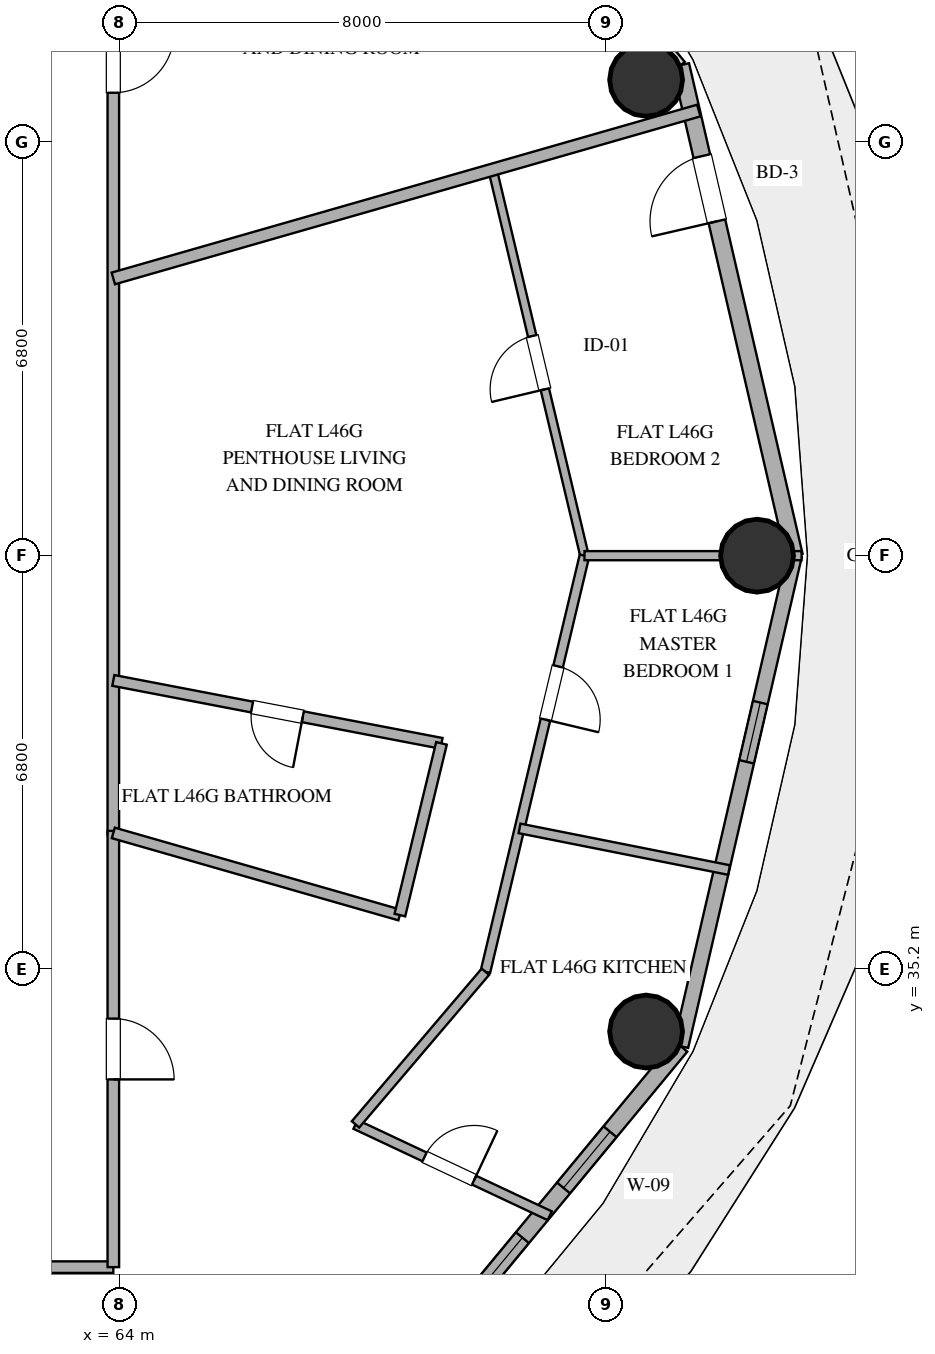
"""IFC4 building model, lengths in metres.
Left out: names, types, materials, properties, quantities, classifications, styles, units other than length and angle.
Written with IfcOpenShell. Run it as: python <this file> out.ifc"""

import sys

from ifc_helpers import new_model, si_unit, direction, frame, frame_2d, origin, origin_2d, place, context, subcontext, project, spatial, rectangle, hollow_circle, extrude, element, fill, save


model = new_model("IFC4")
c1 = context("Model", 3, precision=1e-05, world=origin(), true_north=direction((0.0, 1.0)))
c2 = subcontext(c1, "Body", "Model", "MODEL_VIEW")
j1 = project(units=[si_unit("LENGTHUNIT", "METRE"), si_unit("PLANEANGLEUNIT", "RADIAN")], contexts=[c1])
p1 = place(None, origin())
s1 = spatial("IfcSite", under=j1, at=p1, CompositionType="ELEMENT")
p2 = place(p1, origin())
s2 = spatial("IfcBuilding", under=s1, at=p2, CompositionType="ELEMENT")
p3 = place(p2, frame((0.0, 0.0, 183.0)))
s3 = spatial("IfcBuildingStorey", under=s2, at=p3, CompositionType="ELEMENT", Elevation=183.0)
for number, where, z_axis, x_axis in (
    (1, (74.487, 42.0, 0.0), (0.0, 0.0, 1.0), (1.0, 0.0, 0.0)),
    (2, (72.662, 49.826, 0.0), (0.0, 0.0, 1.0), (1.0, 0.0, 0.0)),
    (3, (72.662, 34.174, 0.0), (0.0, 0.0, 1.0), (1.0, 0.0, 0.0)),
):
    element("IfcColumn", number, at=place(p3, frame(where, z_axis=z_axis, x_axis=x_axis)), inside=s3, PredefinedType="COLUMN", context=c2, shape_type="SweptSolid", body=[
        extrude(hollow_circle(Radius=0.6, WallThickness=0.032, at=origin_2d()), origin(), (0.0, 0.0, 1.0), 3.38),
    ])
p4 = place(p3, frame((75.099, 42.0, 0.0), z_axis=(0.0, 0.0, 1.0), x_axis=(-0.225473184558, 0.974249374157, 0.0)))
e4 = element("IfcWall", 4, at=p4, inside=s3, PredefinedType="SOLIDWALL", context=c2, shape_type="SweptSolid", body=[
    extrude(rectangle(XDim=8.28, YDim=0.28, at=frame_2d((4.14, 0.0))), origin(), (0.0, 0.0, 1.0), 3.38),
])
p5 = place(p4, frame((5.644, 0.0, 0.0)))
e5 = element("IfcOpeningElement", 5, at=p5, cuts=e4, PredefinedType="OPENING", context=c2, shape_type="SweptSolid", body=[
    extrude(rectangle(XDim=1.1, YDim=2.25, at=frame_2d((0.55, 1.125))), frame((0.0, 0.15, 0.0), z_axis=(0.0, -1.0, 0.0), x_axis=(1.0, 0.0, 0.0)), (0.0, 0.0, 1.0), 0.3),
])
p6 = place(p3, frame((67.576, 27.094, 0.0), z_axis=(0.0, 0.0, 1.0), x_axis=(0.637333477683, 0.770588111915, 0.0)))
e6 = element("IfcWall", 6, at=p6, inside=s3, PredefinedType="SOLIDWALL", context=c2, shape_type="SweptSolid", body=[
    extrude(rectangle(XDim=8.875, YDim=0.28, at=frame_2d((4.438, 0.0))), origin(), (0.0, 0.0, 1.0), 3.38),
])
p7 = place(p6, frame((1.775, 0.0, 0.85)))
e7 = element("IfcOpeningElement", 7, at=p7, cuts=e6, PredefinedType="OPENING", context=c2, shape_type="SweptSolid", body=[
    extrude(rectangle(XDim=1.35, YDim=1.8, at=frame_2d((0.675, 0.9))), frame((0.0, 0.15, 0.0), z_axis=(0.0, -1.0, 0.0), x_axis=(1.0, 0.0, 0.0)), (0.0, 0.0, 1.0), 0.3),
])
p8 = place(p6, frame((3.439, 0.0, 0.85)))
e8 = element("IfcOpeningElement", 8, at=p8, cuts=e6, PredefinedType="OPENING", context=c2, shape_type="SweptSolid", body=[
    extrude(rectangle(XDim=1.35, YDim=1.8, at=frame_2d((0.675, 0.9))), frame((0.0, 0.15, 0.0), z_axis=(0.0, -1.0, 0.0), x_axis=(1.0, 0.0, 0.0)), (0.0, 0.0, 1.0), 0.3),
])
p9 = place(p6, frame((5.85, 0.0, 0.85)))
e9 = element("IfcOpeningElement", 9, at=p9, cuts=e6, PredefinedType="OPENING", context=c2, shape_type="SweptSolid", body=[
    extrude(rectangle(XDim=1.2, YDim=1.8, at=frame_2d((0.6, 0.9))), frame((0.0, 0.15, 0.0), z_axis=(0.0, -1.0, 0.0), x_axis=(1.0, 0.0, 0.0)), (0.0, 0.0, 1.0), 0.3),
])
p10 = place(p3, frame((73.232, 33.933, 0.0), z_axis=(0.0, 0.0, 1.0), x_axis=(0.225473184558, 0.974249374157, 0.0)))
e10 = element("IfcWall", 10, at=p10, inside=s3, PredefinedType="SOLIDWALL", context=c2, shape_type="SweptSolid", body=[
    extrude(rectangle(XDim=8.28, YDim=0.25, at=frame_2d((4.14, 0.0))), origin(), (0.0, 0.0, 1.0), 3.38),
])
p11 = place(p10, frame((4.801, 0.0, 0.35)))
e11 = element("IfcOpeningElement", 11, at=p11, cuts=e10, PredefinedType="OPENING", context=c2, shape_type="SweptSolid", body=[
    extrude(rectangle(XDim=1.0, YDim=1.05, at=frame_2d((0.5, 0.525))), frame((0.0, 0.135, 0.0), z_axis=(0.0, -1.0, 0.0), x_axis=(1.0, 0.0, 0.0)), (0.0, 0.0, 1.0), 0.27),
])
p12 = place(p3, frame((46.818, 30.3, 0.0), z_axis=(0.0, 0.0, 1.0), x_axis=(1.0, 0.0, 0.0)))
e12 = element("IfcWall", 12, at=p12, inside=s3, PredefinedType="PARTITIONING", context=c2, shape_type="SweptSolid", body=[
    extrude(rectangle(XDim=17.082, YDim=0.19, at=frame_2d((8.541, 0.0))), origin(), (0.0, 0.0, 1.0), 2.74),
])
p13 = place(p12, frame((5.358, 0.0, 0.0)))
e13 = element("IfcOpeningElement", 13, at=p13, cuts=e12, PredefinedType="OPENING", context=c2, shape_type="SweptSolid", body=[
    extrude(rectangle(XDim=1.0, YDim=2.2, at=frame_2d((0.5, 1.1))), frame((0.0, 0.105, 0.0), z_axis=(0.0, -1.0, 0.0), x_axis=(1.0, 0.0, 0.0)), (0.0, 0.0, 1.0), 0.21),
])
p14 = place(p3, frame((63.9, 53.7, 0.0), z_axis=(0.0, 0.0, 1.0), x_axis=(0.0, -1.0, 0.0)))
e14 = element("IfcWall", 14, at=p14, inside=s3, PredefinedType="PARTITIONING", context=c2, shape_type="SweptSolid", body=[
    extrude(rectangle(XDim=16.292, YDim=0.19, at=frame_2d((8.146, 0.0))), origin(), (0.0, 0.0, 1.0), 2.74),
])
p15 = place(p14, frame((3.087, 0.0, 0.0)))
e15 = element("IfcOpeningElement", 15, at=p15, cuts=e14, PredefinedType="OPENING", context=c2, shape_type="SweptSolid", body=[
    extrude(rectangle(XDim=1.0, YDim=2.2, at=frame_2d((0.5, 1.1))), frame((0.0, 0.105, 0.0), z_axis=(0.0, -1.0, 0.0), x_axis=(1.0, 0.0, 0.0)), (0.0, 0.0, 1.0), 0.21),
])
p16 = place(p3, frame((63.9, 37.474, 0.0), z_axis=(0.0, 0.0, 1.0), x_axis=(0.0, -1.0, 0.0)))
e16 = element("IfcWall", 16, at=p16, inside=s3, PredefinedType="PARTITIONING", context=c2, shape_type="SweptSolid", body=[
    extrude(rectangle(XDim=7.174, YDim=0.19, at=frame_2d((3.587, 0.0))), origin(), (0.0, 0.0, 1.0), 2.74),
])
p17 = place(p16, frame((3.087, 0.0, 0.0)))
e17 = element("IfcOpeningElement", 17, at=p17, cuts=e16, PredefinedType="OPENING", context=c2, shape_type="SweptSolid", body=[
    extrude(rectangle(XDim=1.0, YDim=2.2, at=frame_2d((0.5, 1.1))), frame((0.0, 0.105, 0.0), z_axis=(0.0, -1.0, 0.0), x_axis=(1.0, 0.0, 0.0)), (0.0, 0.0, 1.0), 0.21),
])
p18 = place(p3, frame((71.649, 42.0, 0.0), z_axis=(0.0, 0.0, 1.0), x_axis=(-0.231639074409, 0.972801798522, 0.0)))
e18 = element("IfcWall", 18, at=p18, inside=s3, PredefinedType="PARTITIONING", context=c2, shape_type="SweptSolid", body=[
    extrude(rectangle(XDim=6.525, YDim=0.14, at=frame_2d((3.263, 0.0))), origin(), (0.0, 0.0, 1.0), 2.74),
])
p19 = place(p18, frame((2.812, 0.0, 0.0)))
e19 = element("IfcOpeningElement", 19, at=p19, cuts=e18, PredefinedType="OPENING", context=c2, shape_type="SweptSolid", body=[
    extrude(rectangle(XDim=0.9, YDim=2.1, at=frame_2d((0.45, 1.05))), frame((0.0, 0.08, 0.0), z_axis=(0.0, -1.0, 0.0), x_axis=(1.0, 0.0, 0.0)), (0.0, 0.0, 1.0), 0.16),
])
p20 = place(p3, frame((73.528, 49.32, 0.0), z_axis=(0.0, 0.0, 1.0), x_axis=(-0.961265987417, -0.275622389211, 0.0)))
e20 = element("IfcWall", 20, at=p20, inside=s3, PredefinedType="PARTITIONING", context=c2, shape_type="SweptSolid", body=[
    extrude(rectangle(XDim=10.016, YDim=0.2, at=frame_2d((5.008, 0.0))), origin(), (0.0, 0.0, 1.0), 2.74),
])
p21 = place(p3, frame((69.297, 38.914, 0.0), z_axis=(0.0, 0.0, 1.0), x_axis=(-0.982108019882, 0.188318446478, 0.0)))
e21 = element("IfcWall", 21, at=p21, inside=s3, PredefinedType="PLUMBINGWALL", context=c2, shape_type="SweptSolid", body=[
    extrude(rectangle(XDim=5.496, YDim=0.18, at=frame_2d((2.748, 0.0))), origin(), (0.0, 0.0, 1.0), 2.74),
])
p22 = place(p21, frame((2.323, 0.0, 0.0)))
e22 = element("IfcOpeningElement", 22, at=p22, cuts=e21, PredefinedType="OPENING", context=c2, shape_type="SweptSolid", body=[
    extrude(rectangle(XDim=0.85, YDim=2.1, at=frame_2d((0.425, 1.05))), frame((0.0, 0.1, 0.0), z_axis=(0.0, -1.0, 0.0), x_axis=(1.0, 0.0, 0.0)), (0.0, 0.0, 1.0), 0.2),
])
p23 = place(p3, frame((63.9, 37.441, 0.0), z_axis=(0.0, 0.0, 1.0), x_axis=(0.961266088446, -0.27562203686, 0.0)))
e23 = element("IfcWall", 23, at=p23, inside=s3, PredefinedType="PLUMBINGWALL", context=c2, shape_type="SweptSolid", body=[
    extrude(rectangle(XDim=4.903, YDim=0.18, at=frame_2d((2.451, 0.0))), origin(), (0.0, 0.0, 1.0), 2.74),
])
p24 = place(p3, frame((71.649, 42.0, 0.0), z_axis=(0.0, 0.0, 1.0), x_axis=(-0.231625219966, -0.972805097373, 0.0)))
e24 = element("IfcWall", 24, at=p24, inside=s3, PredefinedType="PLUMBINGWALL", context=c2, shape_type="SweptSolid", body=[
    extrude(rectangle(XDim=7.033, YDim=0.16, at=frame_2d((3.517, 0.0))), origin(), (0.0, 0.0, 1.0), 2.74),
])
p25 = place(p24, frame((1.871, 0.0, 0.0)))
e25 = element("IfcOpeningElement", 25, at=p25, cuts=e24, PredefinedType="OPENING", context=c2, shape_type="SweptSolid", body=[
    extrude(rectangle(XDim=0.9, YDim=2.1, at=frame_2d((0.45, 1.05))), frame((0.0, 0.09, 0.0), z_axis=(0.0, -1.0, 0.0), x_axis=(1.0, 0.0, 0.0)), (0.0, 0.0, 1.0), 0.18),
])
p26 = place(p3, frame((63.445, 24.846, 0.0), z_axis=(0.0, 0.0, 1.0), x_axis=(-0.669111750453, 0.743161802979, 0.0)))
e26 = element("IfcWall", 26, at=p26, inside=s3, PredefinedType="PARTITIONING", context=c2, shape_type="SweptSolid", body=[
    extrude(rectangle(XDim=7.339, YDim=0.2, at=frame_2d((3.669, 0.0))), origin(), (0.0, 0.0, 1.0), 2.74),
])
p27 = place(p3, frame((75.219, 42.0, 0.0), z_axis=(0.0, 0.0, 1.0), x_axis=(-1.0, 0.0, 0.0)))
e27 = element("IfcWall", 27, at=p27, inside=s3, PredefinedType="PARTITIONING", context=c2, shape_type="SweptSolid", body=[
    extrude(rectangle(XDim=3.571, YDim=0.15, at=frame_2d((1.785, 0.0))), origin(), (0.0, 0.0, 1.0), 2.74),
])
p28 = place(p3, frame((67.883, 32.647, 0.0), z_axis=(0.0, 0.0, 1.0), x_axis=(0.904904903403, -0.425613810628, 0.0)))
e28 = element("IfcWall", 28, at=p28, inside=s3, PredefinedType="PLUMBINGWALL", context=c2, shape_type="SweptSolid", body=[
    extrude(rectangle(XDim=3.53, YDim=0.16, at=frame_2d((1.765, 0.0))), origin(), (0.0, 0.0, 1.0), 2.74),
])
p29 = place(p28, frame((1.255, 0.0, 0.0)))
e29 = element("IfcOpeningElement", 29, at=p29, cuts=e28, PredefinedType="OPENING", context=c2, shape_type="SweptSolid", body=[
    extrude(rectangle(XDim=0.9, YDim=2.1, at=frame_2d((0.45, 1.05))), frame((0.0, 0.09, 0.0), z_axis=(0.0, -1.0, 0.0), x_axis=(1.0, 0.0, 0.0)), (0.0, 0.0, 1.0), 0.18),
])
p30 = place(p3, frame((74.026, 36.831, 0.0), z_axis=(0.0, 0.0, 1.0), x_axis=(-0.980839121604, 0.194819448544, 0.0)))
e30 = element("IfcWall", 30, at=p30, inside=s3, PredefinedType="PLUMBINGWALL", context=c2, shape_type="SweptSolid", body=[
    extrude(rectangle(XDim=3.513, YDim=0.16, at=frame_2d((1.756, 0.0))), origin(), (0.0, 0.0, 1.0), 2.74),
])
p31 = place(p3, frame((70.02, 35.158, 0.0), z_axis=(0.0, 0.0, 1.0), x_axis=(-0.648054655451, -0.761593831086, 0.0)))
e31 = element("IfcWall", 31, at=p31, inside=s3, PredefinedType="PLUMBINGWALL", context=c2, shape_type="SweptSolid", body=[
    extrude(rectangle(XDim=3.296, YDim=0.16, at=frame_2d((1.648, 0.0))), origin(), (0.0, 0.0, 1.0), 2.74),
])
p32 = place(p3, frame((68.613, 36.089, 0.0), z_axis=(0.0, 0.0, 1.0), x_axis=(0.235491818528, 0.971876331334, 0.0)))
e32 = element("IfcWall", 32, at=p32, inside=s3, PredefinedType="PLUMBINGWALL", context=c2, shape_type="SweptSolid", body=[
    extrude(rectangle(XDim=2.906, YDim=0.18, at=frame_2d((1.453, 0.0))), origin(), (0.0, 0.0, 1.0), 2.74),
])
p33 = place(p5, origin())
e33 = element("IfcDoor", 33, at=p33, inside=s3, OperationType="SINGLE_SWING_LEFT", PredefinedType="DOOR", context=c2, shape_type="SweptSolid", body=[
    extrude(rectangle(XDim=1.1, YDim=2.25, at=frame_2d((0.55, 1.125))), frame((0.0, 0.025, 0.0), z_axis=(0.0, -1.0, 0.0), x_axis=(1.0, 0.0, 0.0)), (0.0, 0.0, 1.0), 0.05),
])
fill(e5, e33)
p34 = place(p8, origin())
e34 = element("IfcWindow", 34, at=p34, inside=s3, PartitioningType="SINGLE_PANEL", PredefinedType="WINDOW", context=c2, shape_type="SweptSolid", body=[
    extrude(rectangle(XDim=1.35, YDim=1.8, at=frame_2d((0.675, 0.9))), frame((0.0, 0.03, 0.0), z_axis=(0.0, -1.0, 0.0), x_axis=(1.0, 0.0, 0.0)), (0.0, 0.0, 1.0), 0.06),
])
fill(e8, e34)
p35 = place(p9, origin())
e35 = element("IfcWindow", 35, at=p35, inside=s3, PartitioningType="SINGLE_PANEL", PredefinedType="WINDOW", context=c2, shape_type="SweptSolid", body=[
    extrude(rectangle(XDim=1.2, YDim=1.8, at=frame_2d((0.6, 0.9))), frame((0.0, 0.03, 0.0), z_axis=(0.0, -1.0, 0.0), x_axis=(1.0, 0.0, 0.0)), (0.0, 0.0, 1.0), 0.06),
])
fill(e9, e35)
p36 = place(p11, origin())
e36 = element("IfcWindow", 36, at=p36, inside=s3, PartitioningType="SINGLE_PANEL", PredefinedType="WINDOW", context=c2, shape_type="SweptSolid", body=[
    extrude(rectangle(XDim=1.0, YDim=1.05, at=frame_2d((0.5, 0.525))), frame((0.0, 0.03, 0.0), z_axis=(0.0, -1.0, 0.0), x_axis=(1.0, 0.0, 0.0)), (0.0, 0.0, 1.0), 0.06),
])
fill(e11, e36)
p37 = place(p15, origin())
e37 = element("IfcDoor", 37, at=p37, inside=s3, OperationType="SINGLE_SWING_LEFT", PredefinedType="DOOR", context=c2, shape_type="SweptSolid", body=[
    extrude(rectangle(XDim=1.0, YDim=2.2, at=frame_2d((0.5, 1.1))), frame((0.0, 0.025, 0.0), z_axis=(0.0, -1.0, 0.0), x_axis=(1.0, 0.0, 0.0)), (0.0, 0.0, 1.0), 0.05),
])
fill(e15, e37)
p38 = place(p17, origin())
e38 = element("IfcDoor", 38, at=p38, inside=s3, OperationType="SINGLE_SWING_RIGHT", PredefinedType="DOOR", context=c2, shape_type="SweptSolid", body=[
    extrude(rectangle(XDim=1.0, YDim=2.2, at=frame_2d((0.5, 1.1))), frame((0.0, 0.025, 0.0), z_axis=(0.0, -1.0, 0.0), x_axis=(1.0, 0.0, 0.0)), (0.0, 0.0, 1.0), 0.05),
])
fill(e17, e38)
p39 = place(p19, origin())
e39 = element("IfcDoor", 39, at=p39, inside=s3, OperationType="SINGLE_SWING_LEFT", PredefinedType="DOOR", context=c2, shape_type="SweptSolid", body=[
    extrude(rectangle(XDim=0.9, YDim=2.1, at=frame_2d((0.45, 1.05))), frame((0.0, 0.025, 0.0), z_axis=(0.0, -1.0, 0.0), x_axis=(1.0, 0.0, 0.0)), (0.0, 0.0, 1.0), 0.05),
])
fill(e19, e39)
p40 = place(p22, origin())
e40 = element("IfcDoor", 40, at=p40, inside=s3, OperationType="SINGLE_SWING_LEFT", PredefinedType="DOOR", context=c2, shape_type="SweptSolid", body=[
    extrude(rectangle(XDim=0.85, YDim=2.1, at=frame_2d((0.425, 1.05))), frame((0.0, 0.025, 0.0), z_axis=(0.0, -1.0, 0.0), x_axis=(1.0, 0.0, 0.0)), (0.0, 0.0, 1.0), 0.05),
])
fill(e22, e40)
p41 = place(p25, origin())
e41 = element("IfcDoor", 41, at=p41, inside=s3, OperationType="SINGLE_SWING_RIGHT", PredefinedType="DOOR", context=c2, shape_type="SweptSolid", body=[
    extrude(rectangle(XDim=0.9, YDim=2.1, at=frame_2d((0.45, 1.05))), frame((0.0, 0.025, 0.0), z_axis=(0.0, -1.0, 0.0), x_axis=(1.0, 0.0, 0.0)), (0.0, 0.0, 1.0), 0.05),
])
fill(e25, e41)
p42 = place(p29, origin())
e42 = element("IfcDoor", 42, at=p42, inside=s3, OperationType="SINGLE_SWING_RIGHT", PredefinedType="DOOR", context=c2, shape_type="SweptSolid", body=[
    extrude(rectangle(XDim=0.9, YDim=2.1, at=frame_2d((0.45, 1.05))), frame((0.0, 0.025, 0.0), z_axis=(0.0, -1.0, 0.0), x_axis=(1.0, 0.0, 0.0)), (0.0, 0.0, 1.0), 0.05),
])
fill(e29, e42)
save(model, sys.argv[1])
